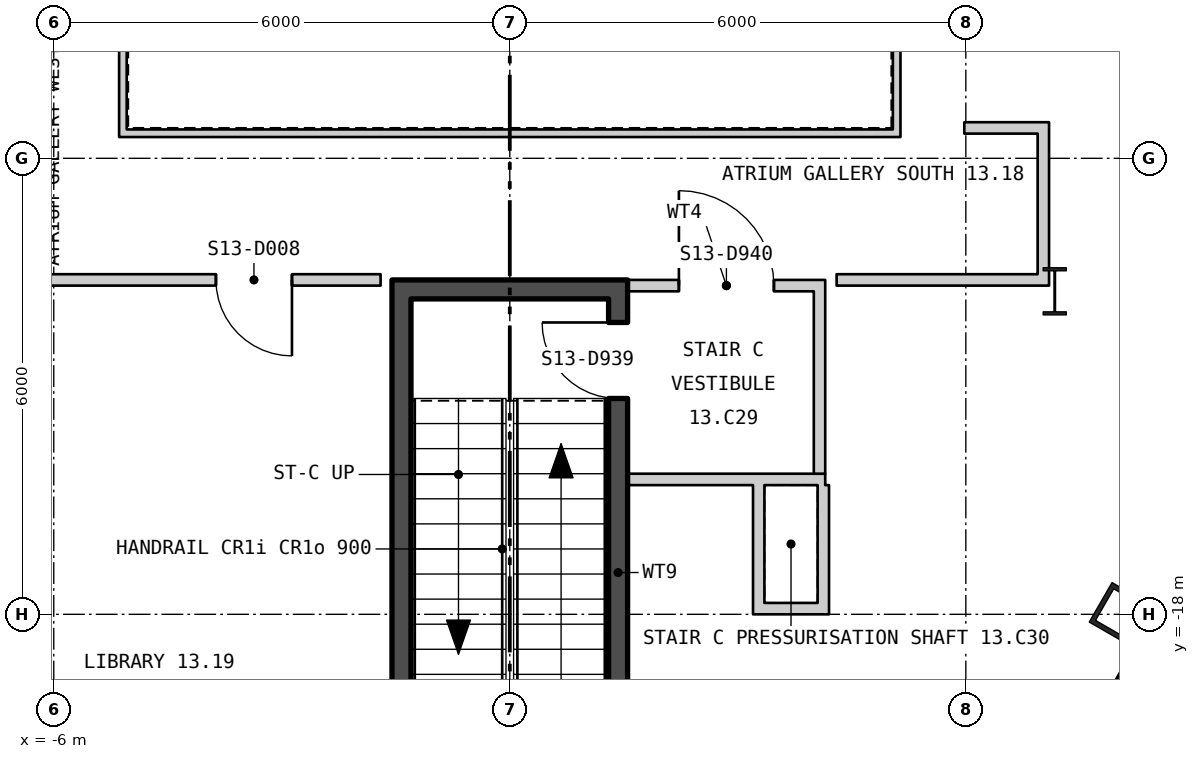
"""IFC4 building model, lengths in metres.
Left out: names, types, materials, properties, quantities, classifications, styles, units other than length and angle.
Written with IfcOpenShell. Run it as: python <this file> out.ifc"""

import sys

from ifc_helpers import new_model, si_unit, direction, frame, frame_2d, origin, origin_2d, place, context, subcontext, project, spatial, polyline, rectangle, hollow_rectangle, i_section, outline, extrude, element, fill, save


model = new_model("IFC4")
c1 = context("Model", 3, precision=1e-05, world=origin(), true_north=direction((0.0, 1.0)))
c2 = subcontext(c1, "Body", "Model", "MODEL_VIEW")
j1 = project(units=[si_unit("LENGTHUNIT", "METRE"), si_unit("PLANEANGLEUNIT", "RADIAN")], contexts=[c1])
p1 = place(None, origin())
s1 = spatial("IfcSite", under=j1, at=p1, CompositionType="ELEMENT")
p2 = place(p1, origin())
s2 = spatial("IfcBuilding", under=s1, at=p2, CompositionType="ELEMENT")
p3 = place(p2, frame((0.0, 0.0, 174.9)))
s3 = spatial("IfcBuildingStorey", under=s2, at=p3, CompositionType="ELEMENT", Elevation=174.9)
p4 = place(p3, frame((8.077, -18.017, 0.0), z_axis=(0.0, 0.0, 1.0), x_axis=(0.5, 0.866025403784, 0.0)))
e1 = element("IfcColumn", 1, at=p4, inside=s3, PredefinedType="COLUMN", context=c2, shape_type="SweptSolid", body=[
    extrude(hollow_rectangle(XDim=0.6, YDim=0.7, WallThickness=0.06, at=origin_2d()), origin(), (0.0, 0.0, 1.0), 3.9),
])
p5 = place(p3, frame((7.17, -13.75, 0.0), z_axis=(0.0, 0.0, 1.0), x_axis=(1.0, 0.0, 0.0)))
e2 = element("IfcColumn", 2, at=p5, inside=s3, PredefinedType="COLUMN", context=c2, shape_type="SweptSolid", body=[
    extrude(i_section(OverallWidth=0.305, OverallDepth=0.62, WebThickness=0.021, FlangeThickness=0.04, at=origin_2d()), origin(), (0.0, 0.0, 1.0), 3.9),
])
p6 = place(p3, frame((-26.775, 13.22, -0.18), z_axis=(0.0, 0.0, 1.0), x_axis=(0.500000335318, -0.866025210188, 0.0)))
e3 = element("IfcWall", 3, at=p6, inside=s3, PredefinedType="SOLIDWALL", context=c2, shape_type="SweptSolid", body=[
    extrude(outline(polyline([(-0.13, -0.225), (45.88, -0.225), (45.62, 0.225), (0.13, 0.225), (-0.13, -0.225)])), origin(), (0.0, 0.0, 1.0), 3.68),
])
p7 = place(p6, frame((1.425, 0.0, 1.08)))
e4 = element("IfcOpeningElement", 4, at=p7, cuts=e3, PredefinedType="OPENING", context=c2, shape_type="SweptSolid", body=[
    extrude(rectangle(XDim=2.4, YDim=2.0, at=frame_2d((1.2, 1.0))), frame((0.0, 0.235, 0.0), z_axis=(0.0, -1.0, 0.0), x_axis=(1.0, 0.0, 0.0)), (0.0, 0.0, 1.0), 0.47),
])
p8 = place(p6, frame((5.895, 0.0, 1.08)))
e5 = element("IfcOpeningElement", 5, at=p8, cuts=e3, PredefinedType="OPENING", context=c2, shape_type="SweptSolid", body=[
    extrude(rectangle(XDim=2.4, YDim=2.0, at=frame_2d((1.2, 1.0))), frame((0.0, 0.235, 0.0), z_axis=(0.0, -1.0, 0.0), x_axis=(1.0, 0.0, 0.0)), (0.0, 0.0, 1.0), 0.47),
])
p9 = place(p6, frame((10.403, 0.0, 1.08)))
e6 = element("IfcOpeningElement", 6, at=p9, cuts=e3, PredefinedType="OPENING", context=c2, shape_type="SweptSolid", body=[
    extrude(rectangle(XDim=2.4, YDim=2.0, at=frame_2d((1.2, 1.0))), frame((0.0, 0.235, 0.0), z_axis=(0.0, -1.0, 0.0), x_axis=(1.0, 0.0, 0.0)), (0.0, 0.0, 1.0), 0.47),
])
p10 = place(p6, frame((14.912, 0.0, 1.08)))
e7 = element("IfcOpeningElement", 7, at=p10, cuts=e3, PredefinedType="OPENING", context=c2, shape_type="SweptSolid", body=[
    extrude(rectangle(XDim=2.4, YDim=2.0, at=frame_2d((1.2, 1.0))), frame((0.0, 0.235, 0.0), z_axis=(0.0, -1.0, 0.0), x_axis=(1.0, 0.0, 0.0)), (0.0, 0.0, 1.0), 0.47),
])
p11 = place(p6, frame((19.421, 0.0, 1.08)))
e8 = element("IfcOpeningElement", 8, at=p11, cuts=e3, PredefinedType="OPENING", context=c2, shape_type="SweptSolid", body=[
    extrude(rectangle(XDim=2.4, YDim=2.0, at=frame_2d((1.2, 1.0))), frame((0.0, 0.235, 0.0), z_axis=(0.0, -1.0, 0.0), x_axis=(1.0, 0.0, 0.0)), (0.0, 0.0, 1.0), 0.47),
])
p12 = place(p6, frame((23.929, 0.0, 1.08)))
e9 = element("IfcOpeningElement", 9, at=p12, cuts=e3, PredefinedType="OPENING", context=c2, shape_type="SweptSolid", body=[
    extrude(rectangle(XDim=2.4, YDim=2.0, at=frame_2d((1.2, 1.0))), frame((0.0, 0.235, 0.0), z_axis=(0.0, -1.0, 0.0), x_axis=(1.0, 0.0, 0.0)), (0.0, 0.0, 1.0), 0.47),
])
p13 = place(p6, frame((28.438, 0.0, 1.08)))
e10 = element("IfcOpeningElement", 10, at=p13, cuts=e3, PredefinedType="OPENING", context=c2, shape_type="SweptSolid", body=[
    extrude(rectangle(XDim=2.4, YDim=2.0, at=frame_2d((1.2, 1.0))), frame((0.0, 0.235, 0.0), z_axis=(0.0, -1.0, 0.0), x_axis=(1.0, 0.0, 0.0)), (0.0, 0.0, 1.0), 0.47),
])
p14 = place(p6, frame((32.947, 0.0, 1.08)))
e11 = element("IfcOpeningElement", 11, at=p14, cuts=e3, PredefinedType="OPENING", context=c2, shape_type="SweptSolid", body=[
    extrude(rectangle(XDim=2.4, YDim=2.0, at=frame_2d((1.2, 1.0))), frame((0.0, 0.235, 0.0), z_axis=(0.0, -1.0, 0.0), x_axis=(1.0, 0.0, 0.0)), (0.0, 0.0, 1.0), 0.47),
])
p15 = place(p6, frame((37.455, 0.0, 1.08)))
e12 = element("IfcOpeningElement", 12, at=p15, cuts=e3, PredefinedType="OPENING", context=c2, shape_type="SweptSolid", body=[
    extrude(rectangle(XDim=2.4, YDim=2.0, at=frame_2d((1.2, 1.0))), frame((0.0, 0.235, 0.0), z_axis=(0.0, -1.0, 0.0), x_axis=(1.0, 0.0, 0.0)), (0.0, 0.0, 1.0), 0.47),
])
p16 = place(p6, frame((41.925, 0.0, 1.08)))
e13 = element("IfcOpeningElement", 13, at=p16, cuts=e3, PredefinedType="OPENING", context=c2, shape_type="SweptSolid", body=[
    extrude(rectangle(XDim=2.4, YDim=2.0, at=frame_2d((1.2, 1.0))), frame((0.0, 0.235, 0.0), z_axis=(0.0, -1.0, 0.0), x_axis=(1.0, 0.0, 0.0)), (0.0, 0.0, 1.0), 0.47),
])
p17 = place(p3, frame((3.9, -26.401, -0.18), z_axis=(0.0, 0.0, 1.0), x_axis=(0.500000335318, 0.866025210188, 0.0)))
e14 = element("IfcWall", 14, at=p17, inside=s3, PredefinedType="SOLIDWALL", context=c2, shape_type="SweptSolid", body=[
    extrude(outline(polyline([(-0.13, -0.225), (45.88, -0.225), (45.62, 0.225), (0.13, 0.225), (-0.13, -0.225)])), origin(), (0.0, 0.0, 1.0), 3.68),
])
p18 = place(p17, frame((1.425, 0.0, 1.08)))
e15 = element("IfcOpeningElement", 15, at=p18, cuts=e14, PredefinedType="OPENING", context=c2, shape_type="SweptSolid", body=[
    extrude(rectangle(XDim=2.4, YDim=2.0, at=frame_2d((1.2, 1.0))), frame((0.0, 0.235, 0.0), z_axis=(0.0, -1.0, 0.0), x_axis=(1.0, 0.0, 0.0)), (0.0, 0.0, 1.0), 0.47),
])
p19 = place(p17, frame((5.895, 0.0, 1.08)))
e16 = element("IfcOpeningElement", 16, at=p19, cuts=e14, PredefinedType="OPENING", context=c2, shape_type="SweptSolid", body=[
    extrude(rectangle(XDim=2.4, YDim=2.0, at=frame_2d((1.2, 1.0))), frame((0.0, 0.235, 0.0), z_axis=(0.0, -1.0, 0.0), x_axis=(1.0, 0.0, 0.0)), (0.0, 0.0, 1.0), 0.47),
])
p20 = place(p17, frame((10.403, 0.0, 1.08)))
e17 = element("IfcOpeningElement", 17, at=p20, cuts=e14, PredefinedType="OPENING", context=c2, shape_type="SweptSolid", body=[
    extrude(rectangle(XDim=2.4, YDim=2.0, at=frame_2d((1.2, 1.0))), frame((0.0, 0.235, 0.0), z_axis=(0.0, -1.0, 0.0), x_axis=(1.0, 0.0, 0.0)), (0.0, 0.0, 1.0), 0.47),
])
p21 = place(p17, frame((14.912, 0.0, 1.08)))
e18 = element("IfcOpeningElement", 18, at=p21, cuts=e14, PredefinedType="OPENING", context=c2, shape_type="SweptSolid", body=[
    extrude(rectangle(XDim=2.4, YDim=2.0, at=frame_2d((1.2, 1.0))), frame((0.0, 0.235, 0.0), z_axis=(0.0, -1.0, 0.0), x_axis=(1.0, 0.0, 0.0)), (0.0, 0.0, 1.0), 0.47),
])
p22 = place(p17, frame((19.421, 0.0, 1.08)))
e19 = element("IfcOpeningElement", 19, at=p22, cuts=e14, PredefinedType="OPENING", context=c2, shape_type="SweptSolid", body=[
    extrude(rectangle(XDim=2.4, YDim=2.0, at=frame_2d((1.2, 1.0))), frame((0.0, 0.235, 0.0), z_axis=(0.0, -1.0, 0.0), x_axis=(1.0, 0.0, 0.0)), (0.0, 0.0, 1.0), 0.47),
])
p23 = place(p17, frame((23.929, 0.0, 1.08)))
e20 = element("IfcOpeningElement", 20, at=p23, cuts=e14, PredefinedType="OPENING", context=c2, shape_type="SweptSolid", body=[
    extrude(rectangle(XDim=2.4, YDim=2.0, at=frame_2d((1.2, 1.0))), frame((0.0, 0.235, 0.0), z_axis=(0.0, -1.0, 0.0), x_axis=(1.0, 0.0, 0.0)), (0.0, 0.0, 1.0), 0.47),
])
p24 = place(p17, frame((37.455, 0.0, 1.08)))
e21 = element("IfcOpeningElement", 21, at=p24, cuts=e14, PredefinedType="OPENING", context=c2, shape_type="SweptSolid", body=[
    extrude(rectangle(XDim=2.4, YDim=2.0, at=frame_2d((1.2, 1.0))), frame((0.0, 0.235, 0.0), z_axis=(0.0, -1.0, 0.0), x_axis=(1.0, 0.0, 0.0)), (0.0, 0.0, 1.0), 0.47),
])
p25 = place(p17, frame((41.925, 0.0, 1.08)))
e22 = element("IfcOpeningElement", 22, at=p25, cuts=e14, PredefinedType="OPENING", context=c2, shape_type="SweptSolid", body=[
    extrude(rectangle(XDim=2.4, YDim=2.0, at=frame_2d((1.2, 1.0))), frame((0.0, 0.235, 0.0), z_axis=(0.0, -1.0, 0.0), x_axis=(1.0, 0.0, 0.0)), (0.0, 0.0, 1.0), 0.47),
])
p26 = place(p3, frame((-5.14, -11.67, 0.0), z_axis=(0.0, 0.0, 1.0), x_axis=(1.0, 0.0, 0.0)))
e23 = element("IfcWall", 23, at=p26, inside=s3, PredefinedType="PARTITIONING", context=c2, shape_type="SweptSolid", body=[
    extrude(rectangle(XDim=10.28, YDim=0.1, at=frame_2d((5.14, 0.0))), origin(), (0.0, 0.0, 1.0), 3.7),
])
for number, where, z_axis, x_axis in (
    (24, (5.09, -11.62, 0.0), (0.0, 0.0, 1.0), (0.0, 1.0, 0.0)),
    (25, (-5.09, -3.58, 0.0), (0.0, 0.0, 1.0), (0.0, -1.0, 0.0)),
):
    element("IfcWall", number, at=place(p3, frame(where, z_axis=z_axis, x_axis=x_axis)), inside=s3, PredefinedType="PARTITIONING", context=c2, shape_type="SweptSolid", body=[
        extrude(rectangle(XDim=8.04, YDim=0.1, at=frame_2d((4.02, 0.0))), origin(), (0.0, 0.0, 1.0), 3.7),
    ])
p27 = place(p3, frame((-1.425, -21.05, 0.0), z_axis=(0.0, 0.0, 1.0), x_axis=(0.0, 1.0, 0.0)))
e26 = element("IfcWall", 26, at=p27, inside=s3, PredefinedType="SHEAR", context=c2, shape_type="SweptSolid", body=[
    extrude(rectangle(XDim=7.2, YDim=0.25, at=frame_2d((3.6, 0.0))), origin(), (0.0, 0.0, 1.0), 3.7),
])
p28 = place(p3, frame((1.425, -21.05, 0.0), z_axis=(0.0, 0.0, 1.0), x_axis=(0.0, 1.0, 0.0)))
e27 = element("IfcWall", 27, at=p28, inside=s3, PredefinedType="SHEAR", context=c2, shape_type="SweptSolid", body=[
    extrude(rectangle(XDim=7.2, YDim=0.25, at=frame_2d((3.6, 0.0))), origin(), (0.0, 0.0, 1.0), 3.7),
])
p29 = place(p28, frame((5.89, 0.0, 0.0)))
e28 = element("IfcOpeningElement", 28, at=p29, cuts=e27, PredefinedType="OPENING", context=c2, shape_type="SweptSolid", body=[
    extrude(rectangle(XDim=1.0, YDim=2.1, at=frame_2d((0.5, 1.05))), frame((0.0, 0.135, 0.0), z_axis=(0.0, -1.0, 0.0), x_axis=(1.0, 0.0, 0.0)), (0.0, 0.0, 1.0), 0.27),
])
p30 = place(p3, frame((-1.55, -13.725, 0.0), z_axis=(0.0, 0.0, 1.0), x_axis=(1.0, 0.0, 0.0)))
e29 = element("IfcWall", 29, at=p30, inside=s3, PredefinedType="SHEAR", context=c2, shape_type="SweptSolid", body=[
    extrude(rectangle(XDim=3.1, YDim=0.25, at=frame_2d((1.55, 0.0))), origin(), (0.0, 0.0, 1.0), 3.7),
])
p31 = place(p3, frame((1.55, -16.225, 0.0), z_axis=(0.0, 0.0, 1.0), x_axis=(1.0, 0.0, 0.0)))
e30 = element("IfcWall", 30, at=p31, inside=s3, PredefinedType="PARTITIONING", context=c2, shape_type="SweptSolid", body=[
    extrude(rectangle(XDim=2.6, YDim=0.15, at=frame_2d((1.3, 0.0))), origin(), (0.0, 0.0, 1.0), 3.7),
])
p32 = place(p3, frame((4.075, -16.15, 0.0), z_axis=(0.0, 0.0, 1.0), x_axis=(0.0, 1.0, 0.0)))
e31 = element("IfcWall", 31, at=p32, inside=s3, PredefinedType="PARTITIONING", context=c2, shape_type="SweptSolid", body=[
    extrude(rectangle(XDim=2.4, YDim=0.15, at=frame_2d((1.2, 0.0))), origin(), (0.0, 0.0, 1.0), 3.7),
])
p33 = place(p3, frame((1.55, -13.675, 0.0), z_axis=(0.0, 0.0, 1.0), x_axis=(1.0, 0.0, 0.0)))
e32 = element("IfcWall", 32, at=p33, inside=s3, PredefinedType="PARTITIONING", context=c2, shape_type="SweptSolid", body=[
    extrude(rectangle(XDim=2.6, YDim=0.15, at=frame_2d((1.3, 0.0))), origin(), (0.0, 0.0, 1.0), 2.886),
])
p34 = place(p33, frame((0.675, 0.0, 0.0)))
e33 = element("IfcOpeningElement", 33, at=p34, cuts=e32, PredefinedType="OPENING", context=c2, shape_type="SweptSolid", body=[
    extrude(rectangle(XDim=1.25, YDim=2.1, at=frame_2d((0.625, 1.05))), frame((0.0, 0.085, 0.0), z_axis=(0.0, -1.0, 0.0), x_axis=(1.0, 0.0, 0.0)), (0.0, 0.0, 1.0), 0.17),
])
p35 = place(p3, frame((3.275, -18.0, 0.0), z_axis=(0.0, 0.0, 1.0), x_axis=(0.0, 1.0, 0.0)))
e34 = element("IfcWall", 34, at=p35, inside=s3, PredefinedType="PARTITIONING", context=c2, shape_type="SweptSolid", body=[
    extrude(rectangle(XDim=1.7, YDim=0.15, at=frame_2d((0.85, 0.0))), origin(), (0.0, 0.0, 1.0), 3.01),
])
p36 = place(p3, frame((3.35, -17.925, 0.0), z_axis=(0.0, 0.0, 1.0), x_axis=(1.0, 0.0, 0.0)))
e35 = element("IfcWall", 35, at=p36, inside=s3, PredefinedType="PARTITIONING", context=c2, shape_type="SweptSolid", body=[
    extrude(rectangle(XDim=0.7, YDim=0.15, at=frame_2d((0.35, 0.0))), origin(), (0.0, 0.0, 1.0), 3.7),
])
p37 = place(p3, frame((4.125, -18.0, 0.0), z_axis=(0.0, 0.0, 1.0), x_axis=(0.0, 1.0, 0.0)))
e36 = element("IfcWall", 36, at=p37, inside=s3, PredefinedType="PARTITIONING", context=c2, shape_type="SweptSolid", body=[
    extrude(rectangle(XDim=1.7, YDim=0.15, at=frame_2d((0.85, 0.0))), origin(), (0.0, 0.0, 1.0), 3.7),
])
p38 = place(p3, frame((-6.945, -13.6, 0.0), z_axis=(0.0, 0.0, 1.0), x_axis=(1.0, 0.0, 0.0)))
e37 = element("IfcWall", 37, at=p38, inside=s3, PredefinedType="PARTITIONING", context=c2, shape_type="SweptSolid", body=[
    extrude(rectangle(XDim=5.245, YDim=0.15, at=frame_2d((2.623, 0.0))), origin(), (0.0, 0.0, 1.0), 2.886),
])
p39 = place(p38, frame((3.079, 0.0, 0.0)))
e38 = element("IfcOpeningElement", 38, at=p39, cuts=e37, PredefinedType="OPENING", context=c2, shape_type="SweptSolid", body=[
    extrude(rectangle(XDim=1.0, YDim=2.1, at=frame_2d((0.5, 1.05))), frame((0.0, 0.085, 0.0), z_axis=(0.0, -1.0, 0.0), x_axis=(1.0, 0.0, 0.0)), (0.0, 0.0, 1.0), 0.17),
])
p40 = place(p3, frame((4.3, -13.6, 0.0), z_axis=(0.0, 0.0, 1.0), x_axis=(1.0, 0.0, 0.0)))
e39 = element("IfcWall", 39, at=p40, inside=s3, PredefinedType="PARTITIONING", context=c2, shape_type="SweptSolid", body=[
    extrude(rectangle(XDim=2.795, YDim=0.15, at=frame_2d((1.397, 0.0))), origin(), (0.0, 0.0, 1.0), 2.886),
])
p41 = place(p3, frame((5.98, -11.6, 0.0), z_axis=(0.0, 0.0, 1.0), x_axis=(1.0, 0.0, 0.0)))
e40 = element("IfcWall", 40, at=p41, inside=s3, PredefinedType="PARTITIONING", context=c2, shape_type="SweptSolid", body=[
    extrude(rectangle(XDim=0.965, YDim=0.15, at=frame_2d((0.482, 0.0))), origin(), (0.0, 0.0, 1.0), 3.7),
])
p42 = place(p3, frame((7.02, -13.525, 0.0), z_axis=(0.0, 0.0, 1.0), x_axis=(0.0, 1.0, 0.0)))
e41 = element("IfcWall", 41, at=p42, inside=s3, PredefinedType="PARTITIONING", context=c2, shape_type="SweptSolid", body=[
    extrude(rectangle(XDim=2.0, YDim=0.15, at=frame_2d((1.0, 0.0))), origin(), (0.0, 0.0, 1.0), 3.11),
])
p43 = place(p29, origin())
e42 = element("IfcDoor", 42, at=p43, inside=s3, OperationType="SINGLE_SWING_LEFT", PredefinedType="DOOR", context=c2, shape_type="SweptSolid", body=[
    extrude(rectangle(XDim=1.0, YDim=2.1, at=frame_2d((0.5, 1.05))), frame((0.0, 0.025, 0.0), z_axis=(0.0, -1.0, 0.0), x_axis=(1.0, 0.0, 0.0)), (0.0, 0.0, 1.0), 0.05),
])
fill(e28, e42)
p44 = place(p34, origin())
e43 = element("IfcDoor", 43, at=p44, inside=s3, OperationType="SINGLE_SWING_RIGHT", PredefinedType="DOOR", context=c2, shape_type="SweptSolid", body=[
    extrude(rectangle(XDim=1.25, YDim=2.1, at=frame_2d((0.625, 1.05))), frame((0.0, 0.025, 0.0), z_axis=(0.0, -1.0, 0.0), x_axis=(1.0, 0.0, 0.0)), (0.0, 0.0, 1.0), 0.05),
])
fill(e33, e43)
p45 = place(p39, origin())
e44 = element("IfcDoor", 44, at=p45, inside=s3, OperationType="SINGLE_SWING_RIGHT", PredefinedType="DOOR", context=c2, shape_type="SweptSolid", body=[
    extrude(rectangle(XDim=1.0, YDim=2.1, at=frame_2d((0.5, 1.05))), frame((0.0, 0.025, 0.0), z_axis=(0.0, -1.0, 0.0), x_axis=(1.0, 0.0, 0.0)), (0.0, 0.0, 1.0), 0.05),
])
fill(e38, e44)
save(model, sys.argv[1])
